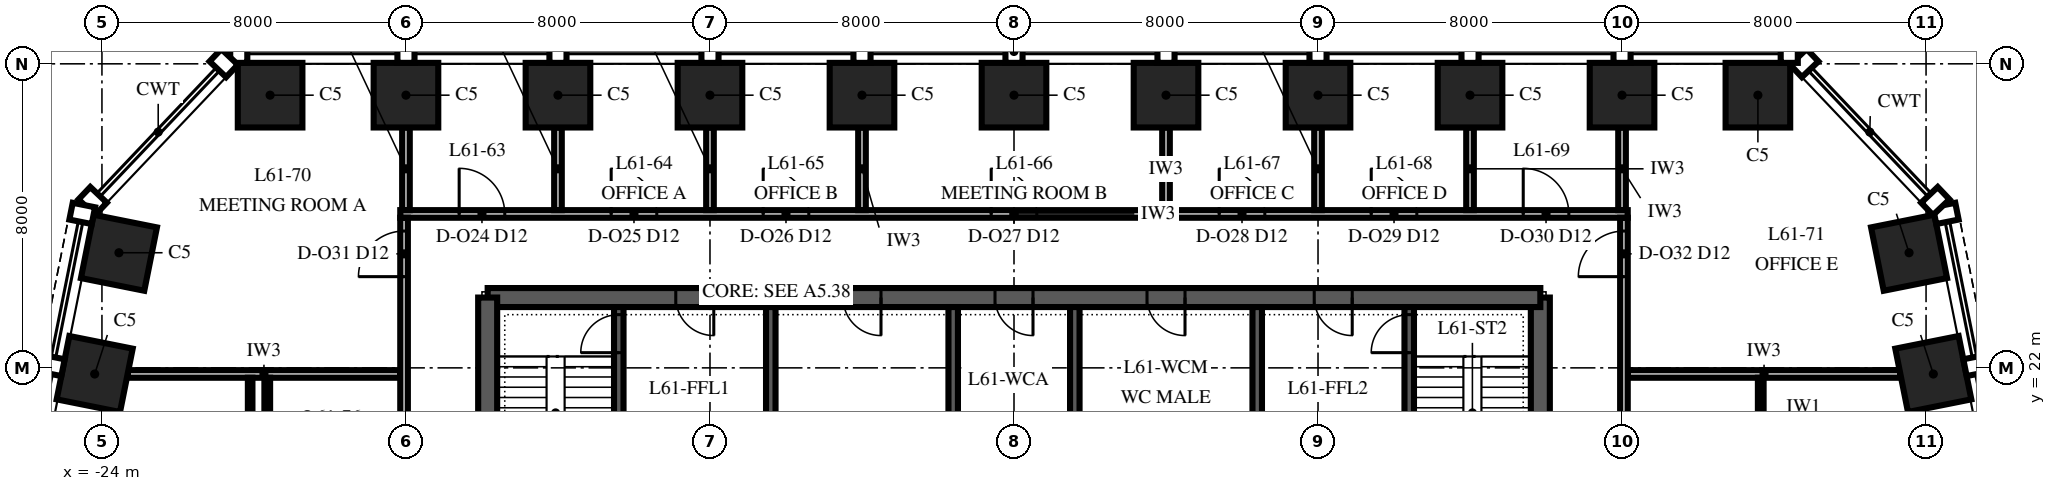
"""IFC4 building model, lengths in metres.
Left out: names, types, materials, properties, quantities, classifications, styles, units other than length and angle.
Written with IfcOpenShell. Run it as: python <this file> out.ifc"""

import sys

from ifc_helpers import new_model, si_unit, direction, frame, frame_2d, origin, origin_2d, place, context, subcontext, project, spatial, polyline, rectangle, outline, extrude, element, fill, save


model = new_model("IFC4")
c1 = context("Model", 3, precision=1e-05, world=origin(), true_north=direction((0.0, 1.0)))
c2 = subcontext(c1, "Body", "Model", "MODEL_VIEW")
j1 = project(units=[si_unit("LENGTHUNIT", "METRE"), si_unit("PLANEANGLEUNIT", "RADIAN")], contexts=[c1])
p1 = place(None, origin())
s1 = spatial("IfcSite", under=j1, at=p1, CompositionType="ELEMENT")
p2 = place(p1, origin())
s2 = spatial("IfcBuilding", under=s1, at=p2, CompositionType="ELEMENT")
p3 = place(p2, frame((0.0, 0.0, 264.0)))
s3 = spatial("IfcBuildingStorey", under=s2, at=p3, CompositionType="ELEMENT", Elevation=264.0)
for number, where, z_axis, x_axis in (
    (1, (24.191, 21.838, 0.0), (0.0, 0.0, 1.0), (-0.196, 0.981, 0.0)),
    (2, (23.553, 25.029, 0.0), (0.0, 0.0, 1.0), (-0.196, 0.981, 0.0)),
    (3, (19.575, 29.175, 0.0), (0.0, 0.0, 1.0), (-1.0, 0.0, 0.0)),
    (4, (16.0, 29.175, 0.0), (0.0, 0.0, 1.0), (-1.0, 0.0, 0.0)),
    (5, (12.0, 29.175, 0.0), (0.0, 0.0, 1.0), (-1.0, 0.0, 0.0)),
    (6, (8.0, 29.175, 0.0), (0.0, 0.0, 1.0), (-1.0, 0.0, 0.0)),
    (7, (4.0, 29.175, 0.0), (0.0, 0.0, 1.0), (-1.0, 0.0, 0.0)),
    (8, (0.0, 29.175, 0.0), (0.0, 0.0, 1.0), (-1.0, 0.0, 0.0)),
    (9, (-4.0, 29.175, 0.0), (0.0, 0.0, 1.0), (-1.0, 0.0, 0.0)),
    (10, (-8.0, 29.175, 0.0), (0.0, 0.0, 1.0), (-1.0, 0.0, 0.0)),
    (11, (-12.0, 29.175, 0.0), (0.0, 0.0, 1.0), (-1.0, 0.0, 0.0)),
    (12, (-16.0, 29.175, 0.0), (0.0, 0.0, 1.0), (-1.0, 0.0, 0.0)),
    (13, (-19.575, 29.175, 0.0), (0.0, 0.0, 1.0), (-1.0, 0.0, 0.0)),
    (14, (-23.553, 25.029, 0.0), (0.0, 0.0, 1.0), (-0.196, -0.981, 0.0)),
    (15, (-24.191, 21.838, 0.0), (0.0, 0.0, 1.0), (-0.196, -0.981, 0.0)),
):
    element("IfcColumn", number, at=place(p3, frame(where, z_axis=z_axis, x_axis=x_axis)), inside=s3, PredefinedType="COLUMN", context=c2, shape_type="SweptSolid", body=[
        extrude(rectangle(XDim=1.7, YDim=1.7, at=origin_2d()), origin(), (0.0, 0.0, 1.0), 4.0),
    ])
p4 = place(p3, frame((13.85, 6.15, 0.0), z_axis=(0.0, 0.0, 1.0), x_axis=(0.0, 1.0, 0.0)))
e16 = element("IfcWall", 16, at=p4, inside=s3, PredefinedType="SHEAR", context=c2, shape_type="SweptSolid", body=[
    extrude(outline(polyline([(0.0, -0.25), (17.7, -0.25), (17.7, 0.0), (17.45, 0.0), (17.45, 0.25), (0.25, 0.25), (0.25, 0.0), (0.0, 0.0), (0.0, -0.25)])), origin(), (0.0, 0.0, 1.0), 4.0),
])
p5 = place(p4, frame((4.15, 0.0, 0.0)))
e17 = element("IfcOpeningElement", 17, at=p5, cuts=e16, PredefinedType="OPENING", context=c2, shape_type="SweptSolid", body=[
    extrude(rectangle(XDim=1.8, YDim=2.4, at=frame_2d((0.9, 1.2))), frame((0.0, 0.265, 0.0), z_axis=(0.0, -1.0, 0.0), x_axis=(1.0, 0.0, 0.0)), (0.0, 0.0, 1.0), 0.53),
])
p6 = place(p3, frame((13.85, 23.85, 0.0), z_axis=(0.0, 0.0, 1.0), x_axis=(-1.0, 0.0, 0.0)))
e18 = element("IfcWall", 18, at=p6, inside=s3, PredefinedType="SHEAR", context=c2, shape_type="SweptSolid", body=[
    extrude(rectangle(XDim=27.7, YDim=0.5, at=frame_2d((13.85, 0.0))), origin(), (0.0, 0.0, 1.0), 4.0),
])
p7 = place(p6, frame((21.75, 0.0, 0.0)))
e19 = element("IfcOpeningElement", 19, at=p7, cuts=e18, PredefinedType="OPENING", context=c2, shape_type="SweptSolid", body=[
    extrude(rectangle(XDim=1.0, YDim=2.1, at=frame_2d((0.5, 1.05))), frame((0.0, 0.265, 0.0), z_axis=(0.0, -1.0, 0.0), x_axis=(1.0, 0.0, 0.0)), (0.0, 0.0, 1.0), 0.53),
])
p8 = place(p6, frame((4.95, 0.0, 0.0)))
e20 = element("IfcOpeningElement", 20, at=p8, cuts=e18, PredefinedType="OPENING", context=c2, shape_type="SweptSolid", body=[
    extrude(rectangle(XDim=1.0, YDim=2.1, at=frame_2d((0.5, 1.05))), frame((0.0, 0.265, 0.0), z_axis=(0.0, -1.0, 0.0), x_axis=(1.0, 0.0, 0.0)), (0.0, 0.0, 1.0), 0.53),
])
p9 = place(p6, frame((17.35, 0.0, 0.0)))
e21 = element("IfcOpeningElement", 21, at=p9, cuts=e18, PredefinedType="OPENING", context=c2, shape_type="SweptSolid", body=[
    extrude(rectangle(XDim=1.0, YDim=2.1, at=frame_2d((0.5, 1.05))), frame((0.0, 0.265, 0.0), z_axis=(0.0, -1.0, 0.0), x_axis=(1.0, 0.0, 0.0)), (0.0, 0.0, 1.0), 0.53),
])
p10 = place(p6, frame((13.35, 0.0, 0.0)))
e22 = element("IfcOpeningElement", 22, at=p10, cuts=e18, PredefinedType="OPENING", context=c2, shape_type="SweptSolid", body=[
    extrude(rectangle(XDim=1.0, YDim=2.1, at=frame_2d((0.5, 1.05))), frame((0.0, 0.265, 0.0), z_axis=(0.0, -1.0, 0.0), x_axis=(1.0, 0.0, 0.0)), (0.0, 0.0, 1.0), 0.53),
])
p11 = place(p6, frame((9.35, 0.0, 0.0)))
e23 = element("IfcOpeningElement", 23, at=p11, cuts=e18, PredefinedType="OPENING", context=c2, shape_type="SweptSolid", body=[
    extrude(rectangle(XDim=1.0, YDim=2.1, at=frame_2d((0.5, 1.05))), frame((0.0, 0.265, 0.0), z_axis=(0.0, -1.0, 0.0), x_axis=(1.0, 0.0, 0.0)), (0.0, 0.0, 1.0), 0.53),
])
p12 = place(p3, frame((-13.85, 23.85, 0.0), z_axis=(0.0, 0.0, 1.0), x_axis=(0.0, -1.0, 0.0)))
e24 = element("IfcWall", 24, at=p12, inside=s3, PredefinedType="SHEAR", context=c2, shape_type="SweptSolid", body=[
    extrude(outline(polyline([(0.0, -0.25), (17.7, -0.25), (17.7, 0.0), (17.45, 0.0), (17.45, 0.25), (0.25, 0.25), (0.25, 0.0), (0.0, 0.0), (0.0, -0.25)])), origin(), (0.0, 0.0, 1.0), 4.0),
])
p13 = place(p12, frame((11.75, 0.0, 0.0)))
e25 = element("IfcOpeningElement", 25, at=p13, cuts=e24, PredefinedType="OPENING", context=c2, shape_type="SweptSolid", body=[
    extrude(rectangle(XDim=1.8, YDim=2.4, at=frame_2d((0.9, 1.2))), frame((0.0, 0.265, 0.0), z_axis=(0.0, -1.0, 0.0), x_axis=(1.0, 0.0, 0.0)), (0.0, 0.0, 1.0), 0.53),
])
p14 = place(p3, frame((-10.4, 16.125, 0.0), z_axis=(0.0, 0.0, 1.0), x_axis=(0.0, 1.0, 0.0)))
e26 = element("IfcWall", 26, at=p14, inside=s3, PredefinedType="SHEAR", context=c2, shape_type="SweptSolid", body=[
    extrude(rectangle(XDim=7.475, YDim=0.25, at=frame_2d((3.738, 0.0))), origin(), (0.0, 0.0, 1.0), 4.0),
])
p15 = place(p14, frame((6.275, 0.0, 0.0)))
e27 = element("IfcOpeningElement", 27, at=p15, cuts=e26, PredefinedType="OPENING", context=c2, shape_type="SweptSolid", body=[
    extrude(rectangle(XDim=1.0, YDim=2.1, at=frame_2d((0.5, 1.05))), frame((0.0, 0.14, 0.0), z_axis=(0.0, -1.0, 0.0), x_axis=(1.0, 0.0, 0.0)), (0.0, 0.0, 1.0), 0.28),
])
for number, where, z_axis, x_axis in (
    (28, (-6.4, 16.125, 0.0), (0.0, 0.0, 1.0), (0.0, 1.0, 0.0)),
    (29, (-1.6, 16.125, 0.0), (0.0, 0.0, 1.0), (0.0, 1.0, 0.0)),
    (30, (1.6, 16.125, 0.0), (0.0, 0.0, 1.0), (0.0, 1.0, 0.0)),
    (31, (6.4, 16.125, 0.0), (0.0, 0.0, 1.0), (0.0, 1.0, 0.0)),
):
    element("IfcWall", number, at=place(p3, frame(where, z_axis=z_axis, x_axis=x_axis)), inside=s3, PredefinedType="SHEAR", context=c2, shape_type="SweptSolid", body=[
        extrude(rectangle(XDim=7.475, YDim=0.25, at=frame_2d((3.738, 0.0))), origin(), (0.0, 0.0, 1.0), 4.0),
    ])
p16 = place(p3, frame((10.4, 16.125, 0.0), z_axis=(0.0, 0.0, 1.0), x_axis=(0.0, 1.0, 0.0)))
e32 = element("IfcWall", 32, at=p16, inside=s3, PredefinedType="SHEAR", context=c2, shape_type="SweptSolid", body=[
    extrude(rectangle(XDim=7.475, YDim=0.25, at=frame_2d((3.738, 0.0))), origin(), (0.0, 0.0, 1.0), 4.0),
])
p17 = place(p16, frame((6.275, 0.0, 0.0)))
e33 = element("IfcOpeningElement", 33, at=p17, cuts=e32, PredefinedType="OPENING", context=c2, shape_type="SweptSolid", body=[
    extrude(rectangle(XDim=1.0, YDim=2.1, at=frame_2d((0.5, 1.05))), frame((0.0, 0.14, 0.0), z_axis=(0.0, -1.0, 0.0), x_axis=(1.0, 0.0, 0.0)), (0.0, 0.0, 1.0), 0.28),
])
for number, where, z_axis, x_axis in (
    (34, (-23.324, 21.84, 0.0), (0.0, 0.0, 1.0), (1.0, 0.0, 0.0)),
    (35, (16.15, 21.84, 0.0), (0.0, 0.0, 1.0), (1.0, 0.0, 0.0)),
):
    element("IfcWall", number, at=place(p3, frame(where, z_axis=z_axis, x_axis=x_axis)), inside=s3, PredefinedType="PARTITIONING", context=c2, shape_type="SweptSolid", body=[
        extrude(rectangle(XDim=7.174, YDim=0.2, at=frame_2d((3.587, 0.0))), origin(), (0.0, 0.0, 1.0), 3.23),
    ])
p18 = place(p3, frame((-16.15, 26.05, 0.0), z_axis=(0.0, 0.0, 1.0), x_axis=(1.0, 0.0, 0.0)))
e36 = element("IfcWall", 36, at=p18, inside=s3, PredefinedType="PARTITIONING", context=c2, shape_type="SweptSolid", body=[
    extrude(rectangle(XDim=32.3, YDim=0.2, at=frame_2d((16.15, 0.0))), origin(), (0.0, 0.0, 1.0), 3.418),
])
p19 = place(p18, frame((1.55, 0.0, 0.0)))
e37 = element("IfcOpeningElement", 37, at=p19, cuts=e36, PredefinedType="OPENING", context=c2, shape_type="SweptSolid", body=[
    extrude(rectangle(XDim=1.2, YDim=2.4, at=frame_2d((0.6, 1.2))), frame((0.0, 0.115, 0.0), z_axis=(0.0, -1.0, 0.0), x_axis=(1.0, 0.0, 0.0)), (0.0, 0.0, 1.0), 0.23),
])
p20 = place(p18, frame((5.55, 0.0, 0.0)))
e38 = element("IfcOpeningElement", 38, at=p20, cuts=e36, PredefinedType="OPENING", context=c2, shape_type="SweptSolid", body=[
    extrude(rectangle(XDim=1.2, YDim=2.4, at=frame_2d((0.6, 1.2))), frame((0.0, 0.115, 0.0), z_axis=(0.0, -1.0, 0.0), x_axis=(1.0, 0.0, 0.0)), (0.0, 0.0, 1.0), 0.23),
])
p21 = place(p18, frame((9.55, 0.0, 0.0)))
e39 = element("IfcOpeningElement", 39, at=p21, cuts=e36, PredefinedType="OPENING", context=c2, shape_type="SweptSolid", body=[
    extrude(rectangle(XDim=1.2, YDim=2.4, at=frame_2d((0.6, 1.2))), frame((0.0, 0.115, 0.0), z_axis=(0.0, -1.0, 0.0), x_axis=(1.0, 0.0, 0.0)), (0.0, 0.0, 1.0), 0.23),
])
p22 = place(p18, frame((15.55, 0.0, 0.0)))
e40 = element("IfcOpeningElement", 40, at=p22, cuts=e36, PredefinedType="OPENING", context=c2, shape_type="SweptSolid", body=[
    extrude(rectangle(XDim=1.2, YDim=2.4, at=frame_2d((0.6, 1.2))), frame((0.0, 0.115, 0.0), z_axis=(0.0, -1.0, 0.0), x_axis=(1.0, 0.0, 0.0)), (0.0, 0.0, 1.0), 0.23),
])
p23 = place(p18, frame((21.55, 0.0, 0.0)))
e41 = element("IfcOpeningElement", 41, at=p23, cuts=e36, PredefinedType="OPENING", context=c2, shape_type="SweptSolid", body=[
    extrude(rectangle(XDim=1.2, YDim=2.4, at=frame_2d((0.6, 1.2))), frame((0.0, 0.115, 0.0), z_axis=(0.0, -1.0, 0.0), x_axis=(1.0, 0.0, 0.0)), (0.0, 0.0, 1.0), 0.23),
])
p24 = place(p18, frame((25.55, 0.0, 0.0)))
e42 = element("IfcOpeningElement", 42, at=p24, cuts=e36, PredefinedType="OPENING", context=c2, shape_type="SweptSolid", body=[
    extrude(rectangle(XDim=1.2, YDim=2.4, at=frame_2d((0.6, 1.2))), frame((0.0, 0.115, 0.0), z_axis=(0.0, -1.0, 0.0), x_axis=(1.0, 0.0, 0.0)), (0.0, 0.0, 1.0), 0.23),
])
p25 = place(p18, frame((29.55, 0.0, 0.0)))
e43 = element("IfcOpeningElement", 43, at=p25, cuts=e36, PredefinedType="OPENING", context=c2, shape_type="SweptSolid", body=[
    extrude(rectangle(XDim=1.2, YDim=2.4, at=frame_2d((0.6, 1.2))), frame((0.0, 0.115, 0.0), z_axis=(0.0, -1.0, 0.0), x_axis=(1.0, 0.0, 0.0)), (0.0, 0.0, 1.0), 0.23),
])
p26 = place(p3, frame((-20.1, 13.9, 0.0), z_axis=(0.0, 0.0, 1.0), x_axis=(0.0, 1.0, 0.0)))
e44 = element("IfcWall", 44, at=p26, inside=s3, PredefinedType="PARTITIONING", context=c2, shape_type="SweptSolid", body=[
    extrude(rectangle(XDim=7.84, YDim=0.12, at=frame_2d((3.92, 0.0))), origin(), (0.0, 0.0, 1.0), 3.23),
])
p27 = place(p26, frame((2.74, 0.0, 0.0)))
e45 = element("IfcOpeningElement", 45, at=p27, cuts=e44, PredefinedType="OPENING", context=c2, shape_type="SweptSolid", body=[
    extrude(rectangle(XDim=1.0, YDim=2.4, at=frame_2d((0.5, 1.2))), frame((0.0, 0.075, 0.0), z_axis=(0.0, -1.0, 0.0), x_axis=(1.0, 0.0, 0.0)), (0.0, 0.0, 1.0), 0.15),
])
p28 = place(p3, frame((-19.65, 17.915, 0.0), z_axis=(0.0, 0.0, 1.0), x_axis=(0.0, 1.0, 0.0)))
e46 = element("IfcWall", 46, at=p28, inside=s3, PredefinedType="PARTITIONING", context=c2, shape_type="SweptSolid", body=[
    extrude(rectangle(XDim=3.825, YDim=0.15, at=frame_2d((1.913, 0.0))), origin(), (0.0, 0.0, 1.0), 3.23),
])
p29 = place(p3, frame((-16.05, 1.94, 0.0), z_axis=(0.0, 0.0, 1.0), x_axis=(0.0, 1.0, 0.0)))
e47 = element("IfcWall", 47, at=p29, inside=s3, PredefinedType="PARTITIONING", context=c2, shape_type="SweptSolid", body=[
    extrude(rectangle(XDim=24.01, YDim=0.2, at=frame_2d((12.005, 0.0))), origin(), (0.0, 0.0, 1.0), 2.842),
])
p30 = place(p29, frame((22.46, 0.0, 0.0)))
e48 = element("IfcOpeningElement", 48, at=p30, cuts=e47, PredefinedType="OPENING", context=c2, shape_type="SweptSolid", body=[
    extrude(rectangle(XDim=1.2, YDim=2.4, at=frame_2d((0.6, 1.2))), frame((0.0, 0.115, 0.0), z_axis=(0.0, -1.0, 0.0), x_axis=(1.0, 0.0, 0.0)), (0.0, 0.0, 1.0), 0.23),
])
p31 = place(p29, frame((6.46, 0.0, 0.0)))
e49 = element("IfcOpeningElement", 49, at=p31, cuts=e47, PredefinedType="OPENING", context=c2, shape_type="SweptSolid", body=[
    extrude(rectangle(XDim=1.2, YDim=2.4, at=frame_2d((0.6, 1.2))), frame((0.0, 0.115, 0.0), z_axis=(0.0, -1.0, 0.0), x_axis=(1.0, 0.0, 0.0)), (0.0, 0.0, 1.0), 0.23),
])
for number, where, z_axis, x_axis in (
    (50, (-16.0, 26.15, 0.0), (0.0, 0.0, 1.0), (0.0, 1.0, 0.0)),
    (51, (-12.0, 26.15, 0.0), (0.0, 0.0, 1.0), (0.0, 1.0, 0.0)),
    (52, (-8.0, 26.15, 0.0), (0.0, 0.0, 1.0), (0.0, 1.0, 0.0)),
    (53, (-4.0, 26.15, 0.0), (0.0, 0.0, 1.0), (0.0, 1.0, 0.0)),
    (54, (4.0, 26.15, 0.0), (0.0, 0.0, 1.0), (0.0, 1.0, 0.0)),
    (55, (8.0, 26.15, 0.0), (0.0, 0.0, 1.0), (0.0, 1.0, 0.0)),
    (56, (12.0, 26.15, 0.0), (0.0, 0.0, 1.0), (0.0, 1.0, 0.0)),
    (57, (16.0, 26.15, 0.0), (0.0, 0.0, 1.0), (0.0, 1.0, 0.0)),
):
    element("IfcWall", number, at=place(p3, frame(where, z_axis=z_axis, x_axis=x_axis)), inside=s3, PredefinedType="PARTITIONING", context=c2, shape_type="SweptSolid", body=[
        extrude(rectangle(XDim=2.175, YDim=0.2, at=frame_2d((1.087, 0.0))), origin(), (0.0, 0.0, 1.0), 3.418),
    ])
p32 = place(p3, frame((16.05, 1.94, 0.0), z_axis=(0.0, 0.0, 1.0), x_axis=(0.0, 1.0, 0.0)))
e58 = element("IfcWall", 58, at=p32, inside=s3, PredefinedType="PARTITIONING", context=c2, shape_type="SweptSolid", body=[
    extrude(rectangle(XDim=24.01, YDim=0.2, at=frame_2d((12.005, 0.0))), origin(), (0.0, 0.0, 1.0), 2.842),
])
p33 = place(p32, frame((22.46, 0.0, 0.0)))
e59 = element("IfcOpeningElement", 59, at=p33, cuts=e58, PredefinedType="OPENING", context=c2, shape_type="SweptSolid", body=[
    extrude(rectangle(XDim=1.2, YDim=2.4, at=frame_2d((0.6, 1.2))), frame((0.0, 0.115, 0.0), z_axis=(0.0, -1.0, 0.0), x_axis=(1.0, 0.0, 0.0)), (0.0, 0.0, 1.0), 0.23),
])
p34 = place(p32, frame((6.46, 0.0, 0.0)))
e60 = element("IfcOpeningElement", 60, at=p34, cuts=e58, PredefinedType="OPENING", context=c2, shape_type="SweptSolid", body=[
    extrude(rectangle(XDim=1.2, YDim=2.4, at=frame_2d((0.6, 1.2))), frame((0.0, 0.115, 0.0), z_axis=(0.0, -1.0, 0.0), x_axis=(1.0, 0.0, 0.0)), (0.0, 0.0, 1.0), 0.23),
])
p35 = place(p3, frame((19.65, 17.915, 0.0), z_axis=(0.0, 0.0, 1.0), x_axis=(0.0, 1.0, 0.0)))
e61 = element("IfcWall", 61, at=p35, inside=s3, PredefinedType="PARTITIONING", context=c2, shape_type="SweptSolid", body=[
    extrude(rectangle(XDim=3.825, YDim=0.15, at=frame_2d((1.913, 0.0))), origin(), (0.0, 0.0, 1.0), 3.23),
])
p36 = place(p35, frame((1.425, 0.0, 0.0)))
e62 = element("IfcOpeningElement", 62, at=p36, cuts=e61, PredefinedType="OPENING", context=c2, shape_type="SweptSolid", body=[
    extrude(rectangle(XDim=1.0, YDim=2.3, at=frame_2d((0.5, 1.15))), frame((0.0, 0.09, 0.0), z_axis=(0.0, -1.0, 0.0), x_axis=(1.0, 0.0, 0.0)), (0.0, 0.0, 1.0), 0.18),
])
p37 = place(p7, origin())
e63 = element("IfcDoor", 63, at=p37, inside=s3, OperationType="SINGLE_SWING_RIGHT", PredefinedType="DOOR", context=c2, shape_type="SweptSolid", body=[
    extrude(rectangle(XDim=1.0, YDim=2.1, at=frame_2d((0.5, 1.05))), frame((0.0, 0.25, 0.0), z_axis=(0.0, -1.0, 0.0), x_axis=(1.0, 0.0, 0.0)), (0.0, 0.0, 1.0), 0.5),
])
fill(e19, e63)
p38 = place(p8, origin())
e64 = element("IfcDoor", 64, at=p38, inside=s3, OperationType="SINGLE_SWING_RIGHT", PredefinedType="DOOR", context=c2, shape_type="SweptSolid", body=[
    extrude(rectangle(XDim=1.0, YDim=2.1, at=frame_2d((0.5, 1.05))), frame((0.0, 0.25, 0.0), z_axis=(0.0, -1.0, 0.0), x_axis=(1.0, 0.0, 0.0)), (0.0, 0.0, 1.0), 0.5),
])
fill(e20, e64)
p39 = place(p9, origin())
e65 = element("IfcDoor", 65, at=p39, inside=s3, OperationType="SINGLE_SWING_LEFT", PredefinedType="DOOR", context=c2, shape_type="SweptSolid", body=[
    extrude(rectangle(XDim=1.0, YDim=2.1, at=frame_2d((0.5, 1.05))), frame((0.0, 0.25, 0.0), z_axis=(0.0, -1.0, 0.0), x_axis=(1.0, 0.0, 0.0)), (0.0, 0.0, 1.0), 0.5),
])
fill(e21, e65)
p40 = place(p10, origin())
e66 = element("IfcDoor", 66, at=p40, inside=s3, OperationType="SINGLE_SWING_LEFT", PredefinedType="DOOR", context=c2, shape_type="SweptSolid", body=[
    extrude(rectangle(XDim=1.0, YDim=2.1, at=frame_2d((0.5, 1.05))), frame((0.0, 0.25, 0.0), z_axis=(0.0, -1.0, 0.0), x_axis=(1.0, 0.0, 0.0)), (0.0, 0.0, 1.0), 0.5),
])
fill(e22, e66)
p41 = place(p11, origin())
e67 = element("IfcDoor", 67, at=p41, inside=s3, OperationType="SINGLE_SWING_LEFT", PredefinedType="DOOR", context=c2, shape_type="SweptSolid", body=[
    extrude(rectangle(XDim=1.0, YDim=2.1, at=frame_2d((0.5, 1.05))), frame((0.0, 0.25, 0.0), z_axis=(0.0, -1.0, 0.0), x_axis=(1.0, 0.0, 0.0)), (0.0, 0.0, 1.0), 0.5),
])
fill(e23, e67)
p42 = place(p15, origin())
e68 = element("IfcDoor", 68, at=p42, inside=s3, OperationType="SINGLE_SWING_LEFT", PredefinedType="DOOR", context=c2, shape_type="SweptSolid", body=[
    extrude(rectangle(XDim=1.0, YDim=2.1, at=frame_2d((0.5, 1.05))), frame((0.0, 0.125, 0.0), z_axis=(0.0, -1.0, 0.0), x_axis=(1.0, 0.0, 0.0)), (0.0, 0.0, 1.0), 0.25),
])
fill(e27, e68)
p43 = place(p17, origin())
e69 = element("IfcDoor", 69, at=p43, inside=s3, OperationType="SINGLE_SWING_LEFT", PredefinedType="DOOR", context=c2, shape_type="SweptSolid", body=[
    extrude(rectangle(XDim=1.0, YDim=2.1, at=frame_2d((0.5, 1.05))), frame((0.0, 0.125, 0.0), z_axis=(0.0, -1.0, 0.0), x_axis=(1.0, 0.0, 0.0)), (0.0, 0.0, 1.0), 0.25),
])
fill(e33, e69)
p44 = place(p19, origin())
e70 = element("IfcDoor", 70, at=p44, inside=s3, OperationType="SINGLE_SWING_LEFT", PredefinedType="DOOR", context=c2, shape_type="SweptSolid", body=[
    extrude(rectangle(XDim=1.2, YDim=2.4, at=frame_2d((0.6, 1.2))), frame((0.0, 0.1, 0.0), z_axis=(0.0, -1.0, 0.0), x_axis=(1.0, 0.0, 0.0)), (0.0, 0.0, 1.0), 0.199),
])
fill(e37, e70)
p45 = place(p20, origin())
e71 = element("IfcDoor", 71, at=p45, inside=s3, OperationType="SINGLE_SWING_LEFT", PredefinedType="DOOR", context=c2, shape_type="SweptSolid", body=[
    extrude(rectangle(XDim=1.2, YDim=2.4, at=frame_2d((0.6, 1.2))), frame((0.0, 0.1, 0.0), z_axis=(0.0, -1.0, 0.0), x_axis=(1.0, 0.0, 0.0)), (0.0, 0.0, 1.0), 0.199),
])
fill(e38, e71)
p46 = place(p21, origin())
e72 = element("IfcDoor", 72, at=p46, inside=s3, OperationType="SINGLE_SWING_LEFT", PredefinedType="DOOR", context=c2, shape_type="SweptSolid", body=[
    extrude(rectangle(XDim=1.2, YDim=2.4, at=frame_2d((0.6, 1.2))), frame((0.0, 0.1, 0.0), z_axis=(0.0, -1.0, 0.0), x_axis=(1.0, 0.0, 0.0)), (0.0, 0.0, 1.0), 0.199),
])
fill(e39, e72)
p47 = place(p22, origin())
e73 = element("IfcDoor", 73, at=p47, inside=s3, OperationType="SINGLE_SWING_LEFT", PredefinedType="DOOR", context=c2, shape_type="SweptSolid", body=[
    extrude(rectangle(XDim=1.2, YDim=2.4, at=frame_2d((0.6, 1.2))), frame((0.0, 0.1, 0.0), z_axis=(0.0, -1.0, 0.0), x_axis=(1.0, 0.0, 0.0)), (0.0, 0.0, 1.0), 0.199),
])
fill(e40, e73)
p48 = place(p23, origin())
e74 = element("IfcDoor", 74, at=p48, inside=s3, OperationType="SINGLE_SWING_LEFT", PredefinedType="DOOR", context=c2, shape_type="SweptSolid", body=[
    extrude(rectangle(XDim=1.2, YDim=2.4, at=frame_2d((0.6, 1.2))), frame((0.0, 0.1, 0.0), z_axis=(0.0, -1.0, 0.0), x_axis=(1.0, 0.0, 0.0)), (0.0, 0.0, 1.0), 0.199),
])
fill(e41, e74)
p49 = place(p24, origin())
e75 = element("IfcDoor", 75, at=p49, inside=s3, OperationType="SINGLE_SWING_LEFT", PredefinedType="DOOR", context=c2, shape_type="SweptSolid", body=[
    extrude(rectangle(XDim=1.2, YDim=2.4, at=frame_2d((0.6, 1.2))), frame((0.0, 0.1, 0.0), z_axis=(0.0, -1.0, 0.0), x_axis=(1.0, 0.0, 0.0)), (0.0, 0.0, 1.0), 0.199),
])
fill(e42, e75)
p50 = place(p25, origin())
e76 = element("IfcDoor", 76, at=p50, inside=s3, OperationType="SINGLE_SWING_LEFT", PredefinedType="DOOR", context=c2, shape_type="SweptSolid", body=[
    extrude(rectangle(XDim=1.2, YDim=2.4, at=frame_2d((0.6, 1.2))), frame((0.0, 0.1, 0.0), z_axis=(0.0, -1.0, 0.0), x_axis=(1.0, 0.0, 0.0)), (0.0, 0.0, 1.0), 0.199),
])
fill(e43, e76)
p51 = place(p30, origin())
e77 = element("IfcDoor", 77, at=p51, inside=s3, OperationType="SINGLE_SWING_LEFT", PredefinedType="DOOR", context=c2, shape_type="SweptSolid", body=[
    extrude(rectangle(XDim=1.2, YDim=2.4, at=frame_2d((0.6, 1.2))), frame((0.0, 0.1, 0.0), z_axis=(0.0, -1.0, 0.0), x_axis=(1.0, 0.0, 0.0)), (0.0, 0.0, 1.0), 0.199),
])
fill(e48, e77)
p52 = place(p33, origin())
e78 = element("IfcDoor", 78, at=p52, inside=s3, OperationType="SINGLE_SWING_LEFT", PredefinedType="DOOR", context=c2, shape_type="SweptSolid", body=[
    extrude(rectangle(XDim=1.2, YDim=2.4, at=frame_2d((0.6, 1.2))), frame((0.0, 0.1, 0.0), z_axis=(0.0, -1.0, 0.0), x_axis=(1.0, 0.0, 0.0)), (0.0, 0.0, 1.0), 0.199),
])
fill(e59, e78)
save(model, sys.argv[1])
